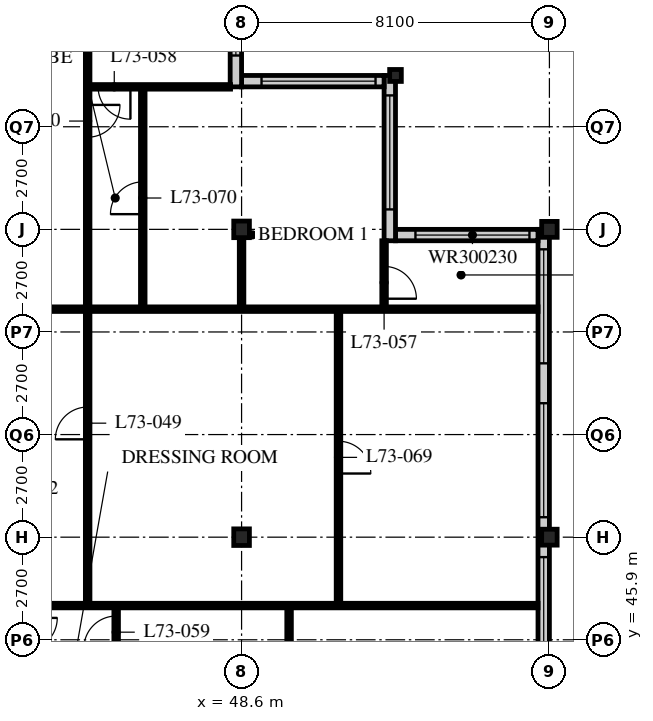
"""IFC4 building model, lengths in metres.
Left out: names, types, materials, properties, quantities, classifications, styles, units other than length and angle.
Written with IfcOpenShell. Run it as: python <this file> out.ifc"""

import sys

from ifc_helpers import new_model, si_unit, direction, frame, frame_2d, origin, origin_2d, place, context, subcontext, project, spatial, rectangle, i_section, extrude, element, fill, save


model = new_model("IFC4")
c1 = context("Model", 3, precision=1e-05, world=origin(), true_north=direction((0.0, 1.0)))
c2 = subcontext(c1, "Body", "Model", "MODEL_VIEW")
j1 = project(units=[si_unit("LENGTHUNIT", "METRE"), si_unit("PLANEANGLEUNIT", "RADIAN")], contexts=[c1])
p1 = place(None, origin())
s1 = spatial("IfcSite", under=j1, at=p1, CompositionType="ELEMENT")
p2 = place(p1, origin())
s2 = spatial("IfcBuilding", under=s1, at=p2, CompositionType="ELEMENT")
p3 = place(p2, frame((0.0, 0.0, 285.3)))
s3 = spatial("IfcBuildingStorey", under=s2, at=p3, CompositionType="ELEMENT", Elevation=285.3)
for number, where, z_axis, x_axis in (
    (1, (48.6, 48.6, 0.0), (0.0, 0.0, 1.0), (1.0, 0.0, 0.0)),
    (2, (48.6, 56.7, 0.0), (0.0, 0.0, 1.0), (1.0, 0.0, 0.0)),
):
    element("IfcColumn", number, at=place(p3, frame(where, z_axis=z_axis, x_axis=x_axis)), inside=s3, PredefinedType="COLUMN", context=c2, shape_type="SweptSolid", body=[
        extrude(i_section(OverallWidth=0.412, OverallDepth=0.437, WebThickness=0.036, FlangeThickness=0.058, FilletRadius=0.015, at=origin_2d()), origin(), (0.0, 0.0, 1.0), 3.9),
    ])
p4 = place(p3, frame((52.65, 60.75, 0.0), z_axis=(0.0, 0.0, 1.0), x_axis=(1.0, 0.0, 0.0)))
e3 = element("IfcColumn", 3, at=p4, inside=s3, PredefinedType="COLUMN", context=c2, shape_type="SweptSolid", body=[
    extrude(i_section(OverallWidth=0.307, OverallDepth=0.314, WebThickness=0.012, FlangeThickness=0.019, FilletRadius=0.015, at=origin_2d()), origin(), (0.0, 0.0, 1.0), 3.9),
])
for number, where, z_axis, x_axis in (
    (4, (56.7, 48.6, 0.0), (0.0, 0.0, 1.0), (1.0, 0.0, 0.0)),
    (5, (56.7, 56.7, 0.0), (0.0, 0.0, 1.0), (1.0, 0.0, 0.0)),
):
    element("IfcColumn", number, at=place(p3, frame(where, z_axis=z_axis, x_axis=x_axis)), inside=s3, PredefinedType="COLUMN", context=c2, shape_type="SweptSolid", body=[
        extrude(i_section(OverallWidth=0.407, OverallDepth=0.419, WebThickness=0.031, FlangeThickness=0.049, FilletRadius=0.015, at=origin_2d()), origin(), (0.0, 0.0, 1.0), 3.9),
    ])
p5 = place(p3, frame((56.55, 24.6, 0.0), z_axis=(0.0, 0.0, 1.0), x_axis=(0.0, 1.0, 0.0)))
e6 = element("IfcWall", 6, at=p5, inside=s3, PredefinedType="SOLIDWALL", context=c2, shape_type="SweptSolid", body=[
    extrude(rectangle(XDim=32.1, YDim=0.3, at=frame_2d((16.05, 0.0))), origin(), (0.0, 0.0, 1.0), 3.69),
])
p6 = place(p5, frame((0.225, 0.0, 0.6)))
e7 = element("IfcOpeningElement", 7, at=p6, cuts=e6, PredefinedType="OPENING", context=c2, shape_type="SweptSolid", body=[
    extrude(rectangle(XDim=3.0, YDim=2.4, at=frame_2d((1.5, 1.2))), frame((0.0, 0.16, 0.0), z_axis=(0.0, -1.0, 0.0), x_axis=(1.0, 0.0, 0.0)), (0.0, 0.0, 1.0), 0.32),
])
p7 = place(p5, frame((4.275, 0.0, 0.6)))
e8 = element("IfcOpeningElement", 8, at=p7, cuts=e6, PredefinedType="OPENING", context=c2, shape_type="SweptSolid", body=[
    extrude(rectangle(XDim=3.0, YDim=2.4, at=frame_2d((1.5, 1.2))), frame((0.0, 0.16, 0.0), z_axis=(0.0, -1.0, 0.0), x_axis=(1.0, 0.0, 0.0)), (0.0, 0.0, 1.0), 0.32),
])
p8 = place(p5, frame((8.325, 0.0, 0.6)))
e9 = element("IfcOpeningElement", 9, at=p8, cuts=e6, PredefinedType="OPENING", context=c2, shape_type="SweptSolid", body=[
    extrude(rectangle(XDim=3.0, YDim=2.4, at=frame_2d((1.5, 1.2))), frame((0.0, 0.16, 0.0), z_axis=(0.0, -1.0, 0.0), x_axis=(1.0, 0.0, 0.0)), (0.0, 0.0, 1.0), 0.32),
])
p9 = place(p5, frame((12.375, 0.0, 0.6)))
e10 = element("IfcOpeningElement", 10, at=p9, cuts=e6, PredefinedType="OPENING", context=c2, shape_type="SweptSolid", body=[
    extrude(rectangle(XDim=3.0, YDim=2.4, at=frame_2d((1.5, 1.2))), frame((0.0, 0.16, 0.0), z_axis=(0.0, -1.0, 0.0), x_axis=(1.0, 0.0, 0.0)), (0.0, 0.0, 1.0), 0.32),
])
p10 = place(p5, frame((16.425, 0.0, 0.6)))
e11 = element("IfcOpeningElement", 11, at=p10, cuts=e6, PredefinedType="OPENING", context=c2, shape_type="SweptSolid", body=[
    extrude(rectangle(XDim=3.0, YDim=2.4, at=frame_2d((1.5, 1.2))), frame((0.0, 0.16, 0.0), z_axis=(0.0, -1.0, 0.0), x_axis=(1.0, 0.0, 0.0)), (0.0, 0.0, 1.0), 0.32),
])
p11 = place(p5, frame((20.475, 0.0, 0.6)))
e12 = element("IfcOpeningElement", 12, at=p11, cuts=e6, PredefinedType="OPENING", context=c2, shape_type="SweptSolid", body=[
    extrude(rectangle(XDim=3.0, YDim=2.4, at=frame_2d((1.5, 1.2))), frame((0.0, 0.16, 0.0), z_axis=(0.0, -1.0, 0.0), x_axis=(1.0, 0.0, 0.0)), (0.0, 0.0, 1.0), 0.32),
])
p12 = place(p5, frame((24.525, 0.0, 0.6)))
e13 = element("IfcOpeningElement", 13, at=p12, cuts=e6, PredefinedType="OPENING", context=c2, shape_type="SweptSolid", body=[
    extrude(rectangle(XDim=3.0, YDim=2.4, at=frame_2d((1.5, 1.2))), frame((0.0, 0.16, 0.0), z_axis=(0.0, -1.0, 0.0), x_axis=(1.0, 0.0, 0.0)), (0.0, 0.0, 1.0), 0.32),
])
p13 = place(p5, frame((28.575, 0.0, 0.6)))
e14 = element("IfcOpeningElement", 14, at=p13, cuts=e6, PredefinedType="OPENING", context=c2, shape_type="SweptSolid", body=[
    extrude(rectangle(XDim=3.0, YDim=2.4, at=frame_2d((1.5, 1.2))), frame((0.0, 0.16, 0.0), z_axis=(0.0, -1.0, 0.0), x_axis=(1.0, 0.0, 0.0)), (0.0, 0.0, 1.0), 0.32),
])
p14 = place(p3, frame((56.4, 56.55, 0.0), z_axis=(0.0, 0.0, 1.0), x_axis=(-1.0, 0.0, 0.0)))
e15 = element("IfcWall", 15, at=p14, inside=s3, PredefinedType="SOLIDWALL", context=c2, shape_type="SweptSolid", body=[
    extrude(rectangle(XDim=3.75, YDim=0.3, at=frame_2d((1.875, 0.0))), origin(), (0.0, 0.0, 1.0), 3.69),
])
p15 = place(p14, frame((0.225, 0.0, 0.6)))
e16 = element("IfcOpeningElement", 16, at=p15, cuts=e15, PredefinedType="OPENING", context=c2, shape_type="SweptSolid", body=[
    extrude(rectangle(XDim=3.0, YDim=2.3, at=frame_2d((1.5, 1.15))), frame((0.0, 0.16, 0.0), z_axis=(0.0, -1.0, 0.0), x_axis=(1.0, 0.0, 0.0)), (0.0, 0.0, 1.0), 0.32),
])
p16 = place(p3, frame((52.5, 56.4, 0.0), z_axis=(0.0, 0.0, 1.0), x_axis=(0.0, 1.0, 0.0)))
e17 = element("IfcWall", 17, at=p16, inside=s3, PredefinedType="SOLIDWALL", context=c2, shape_type="SweptSolid", body=[
    extrude(rectangle(XDim=4.35, YDim=0.3, at=frame_2d((2.175, 0.0))), origin(), (0.0, 0.0, 1.0), 3.69),
])
p17 = place(p16, frame((0.825, 0.0, 0.6)))
e18 = element("IfcOpeningElement", 18, at=p17, cuts=e17, PredefinedType="OPENING", context=c2, shape_type="SweptSolid", body=[
    extrude(rectangle(XDim=3.0, YDim=2.3, at=frame_2d((1.5, 1.15))), frame((0.0, 0.16, 0.0), z_axis=(0.0, -1.0, 0.0), x_axis=(1.0, 0.0, 0.0)), (0.0, 0.0, 1.0), 0.32),
])
p18 = place(p3, frame((52.35, 60.6, 0.0), z_axis=(0.0, 0.0, 1.0), x_axis=(-1.0, 0.0, 0.0)))
e19 = element("IfcWall", 19, at=p18, inside=s3, PredefinedType="SOLIDWALL", context=c2, shape_type="SweptSolid", body=[
    extrude(rectangle(XDim=3.75, YDim=0.3, at=frame_2d((1.875, 0.0))), origin(), (0.0, 0.0, 1.0), 3.69),
])
p19 = place(p18, frame((0.225, 0.0, 0.6)))
e20 = element("IfcOpeningElement", 20, at=p19, cuts=e19, PredefinedType="OPENING", context=c2, shape_type="SweptSolid", body=[
    extrude(rectangle(XDim=3.0, YDim=2.3, at=frame_2d((1.5, 1.15))), frame((0.0, 0.16, 0.0), z_axis=(0.0, -1.0, 0.0), x_axis=(1.0, 0.0, 0.0)), (0.0, 0.0, 1.0), 0.32),
])
p20 = place(p3, frame((48.45, 60.45, 0.0), z_axis=(0.0, 0.0, 1.0), x_axis=(0.0, 1.0, 0.0)))
e21 = element("IfcWall", 21, at=p20, inside=s3, PredefinedType="SOLIDWALL", context=c2, shape_type="SweptSolid", body=[
    extrude(rectangle(XDim=4.35, YDim=0.3, at=frame_2d((2.175, 0.0))), origin(), (0.0, 0.0, 1.0), 3.69),
])
p21 = place(p20, frame((0.825, 0.0, 0.6)))
e22 = element("IfcOpeningElement", 22, at=p21, cuts=e21, PredefinedType="OPENING", context=c2, shape_type="SweptSolid", body=[
    extrude(rectangle(XDim=3.0, YDim=2.3, at=frame_2d((1.5, 1.15))), frame((0.0, 0.16, 0.0), z_axis=(0.0, -1.0, 0.0), x_axis=(1.0, 0.0, 0.0)), (0.0, 0.0, 1.0), 0.32),
])
p22 = place(p3, frame((42.9, 46.8, 0.0), z_axis=(0.0, 0.0, 1.0), x_axis=(1.0, 0.0, 0.0)))
e23 = element("IfcWall", 23, at=p22, inside=s3, PredefinedType="PARTITIONING", context=c2, shape_type="SweptSolid", body=[
    extrude(rectangle(XDim=13.5, YDim=0.12, at=frame_2d((6.75, 0.0))), origin(), (0.0, 0.0, 1.0), 3.69),
])
p23 = place(p3, frame((36.45, 54.6, 0.0), z_axis=(0.0, 0.0, 1.0), x_axis=(1.0, 0.0, 0.0)))
e24 = element("IfcWall", 24, at=p23, inside=s3, PredefinedType="PARTITIONING", context=c2, shape_type="SweptSolid", body=[
    extrude(rectangle(XDim=19.95, YDim=0.12, at=frame_2d((9.975, 0.0))), origin(), (0.0, 0.0, 1.0), 3.69),
])
p24 = place(p23, frame((1.675, 0.0, 0.0)))
e25 = element("IfcOpeningElement", 25, at=p24, cuts=e24, PredefinedType="OPENING", context=c2, shape_type="SweptSolid", body=[
    extrude(rectangle(XDim=0.85, YDim=2.1, at=frame_2d((0.425, 1.05))), frame((0.0, 0.07, 0.0), z_axis=(0.0, -1.0, 0.0), x_axis=(1.0, 0.0, 0.0)), (0.0, 0.0, 1.0), 0.14),
])
p25 = place(p3, frame((44.55, 64.5, 0.0), z_axis=(0.0, 0.0, 1.0), x_axis=(0.0, -1.0, 0.0)))
e26 = element("IfcWall", 26, at=p25, inside=s3, PredefinedType="PARTITIONING", context=c2, shape_type="SweptSolid", body=[
    extrude(rectangle(XDim=17.7, YDim=0.12, at=frame_2d((8.85, 0.0))), origin(), (0.0, 0.0, 1.0), 3.69),
])
p26 = place(p25, frame((12.475, 0.0, 0.0)))
e27 = element("IfcOpeningElement", 27, at=p26, cuts=e26, PredefinedType="OPENING", context=c2, shape_type="SweptSolid", body=[
    extrude(rectangle(XDim=0.85, YDim=2.1, at=frame_2d((0.425, 1.05))), frame((0.0, 0.07, 0.0), z_axis=(0.0, -1.0, 0.0), x_axis=(1.0, 0.0, 0.0)), (0.0, 0.0, 1.0), 0.14),
])
p27 = place(p25, frame((4.525, 0.0, 0.0)))
e28 = element("IfcOpeningElement", 28, at=p27, cuts=e26, PredefinedType="OPENING", context=c2, shape_type="SweptSolid", body=[
    extrude(rectangle(XDim=0.85, YDim=2.1, at=frame_2d((0.425, 1.05))), frame((0.0, 0.07, 0.0), z_axis=(0.0, -1.0, 0.0), x_axis=(1.0, 0.0, 0.0)), (0.0, 0.0, 1.0), 0.14),
])
p28 = place(p3, frame((52.35, 54.6, 0.0), z_axis=(0.0, 0.0, 1.0), x_axis=(0.0, 1.0, 0.0)))
e29 = element("IfcWall", 29, at=p28, inside=s3, PredefinedType="PARTITIONING", context=c2, shape_type="SweptSolid", body=[
    extrude(rectangle(XDim=1.8, YDim=0.12, at=frame_2d((0.9, 0.0))), origin(), (0.0, 0.0, 1.0), 3.69),
])
p29 = place(p28, frame((0.275, 0.0, 0.0)))
e30 = element("IfcOpeningElement", 30, at=p29, cuts=e29, PredefinedType="OPENING", context=c2, shape_type="SweptSolid", body=[
    extrude(rectangle(XDim=0.85, YDim=2.1, at=frame_2d((0.425, 1.05))), frame((0.0, 0.07, 0.0), z_axis=(0.0, -1.0, 0.0), x_axis=(1.0, 0.0, 0.0)), (0.0, 0.0, 1.0), 0.14),
])
p30 = place(p3, frame((48.31, 60.45, 0.0), z_axis=(0.0, 0.0, 1.0), x_axis=(-1.0, 0.0, 0.0)))
e31 = element("IfcWall", 31, at=p30, inside=s3, PredefinedType="PARTITIONING", context=c2, shape_type="SweptSolid", body=[
    extrude(rectangle(XDim=3.76, YDim=0.12, at=frame_2d((1.88, 0.0))), origin(), (0.0, 0.0, 1.0), 3.69),
])
p31 = place(p30, frame((2.635, 0.0, 0.0)))
e32 = element("IfcOpeningElement", 32, at=p31, cuts=e31, PredefinedType="OPENING", context=c2, shape_type="SweptSolid", body=[
    extrude(rectangle(XDim=0.85, YDim=2.1, at=frame_2d((0.425, 1.05))), frame((0.0, 0.07, 0.0), z_axis=(0.0, -1.0, 0.0), x_axis=(1.0, 0.0, 0.0)), (0.0, 0.0, 1.0), 0.14),
])
p32 = place(p3, frame((45.3, 46.8, 0.0), z_axis=(0.0, 0.0, 1.0), x_axis=(0.0, -1.0, 0.0)))
e33 = element("IfcWall", 33, at=p32, inside=s3, PredefinedType="PARTITIONING", context=c2, shape_type="SweptSolid", body=[
    extrude(rectangle(XDim=4.01, YDim=0.12, at=frame_2d((2.005, 0.0))), origin(), (0.0, 0.0, 1.0), 3.69),
])
p33 = place(p32, frame((0.275, 0.0, 0.0)))
e34 = element("IfcOpeningElement", 34, at=p33, cuts=e33, PredefinedType="OPENING", context=c2, shape_type="SweptSolid", body=[
    extrude(rectangle(XDim=0.85, YDim=2.1, at=frame_2d((0.425, 1.05))), frame((0.0, 0.07, 0.0), z_axis=(0.0, -1.0, 0.0), x_axis=(1.0, 0.0, 0.0)), (0.0, 0.0, 1.0), 0.14),
])
p34 = place(p3, frame((51.15, 46.8, 0.0), z_axis=(0.0, 0.0, 1.0), x_axis=(0.0, 1.0, 0.0)))
e35 = element("IfcWall", 35, at=p34, inside=s3, PredefinedType="PARTITIONING", context=c2, shape_type="SweptSolid", body=[
    extrude(rectangle(XDim=7.8, YDim=0.12, at=frame_2d((3.9, 0.0))), origin(), (0.0, 0.0, 1.0), 3.69),
])
p35 = place(p34, frame((3.475, 0.0, 0.0)))
e36 = element("IfcOpeningElement", 36, at=p35, cuts=e35, PredefinedType="OPENING", context=c2, shape_type="SweptSolid", body=[
    extrude(rectangle(XDim=0.85, YDim=2.1, at=frame_2d((0.425, 1.05))), frame((0.0, 0.07, 0.0), z_axis=(0.0, -1.0, 0.0), x_axis=(1.0, 0.0, 0.0)), (0.0, 0.0, 1.0), 0.14),
])
p36 = place(p3, frame((46.0, 54.6, 0.0), z_axis=(0.0, 0.0, 1.0), x_axis=(0.0, 1.0, 0.0)))
e37 = element("IfcWall", 37, at=p36, inside=s3, PredefinedType="PARTITIONING", context=c2, shape_type="SweptSolid", body=[
    extrude(rectangle(XDim=5.85, YDim=0.12, at=frame_2d((2.925, 0.0))), origin(), (0.0, 0.0, 1.0), 3.69),
])
p37 = place(p36, frame((2.5, 0.0, 0.0)))
e38 = element("IfcOpeningElement", 38, at=p37, cuts=e37, PredefinedType="OPENING", context=c2, shape_type="SweptSolid", body=[
    extrude(rectangle(XDim=0.85, YDim=2.1, at=frame_2d((0.425, 1.05))), frame((0.0, 0.07, 0.0), z_axis=(0.0, -1.0, 0.0), x_axis=(1.0, 0.0, 0.0)), (0.0, 0.0, 1.0), 0.14),
])
p38 = place(p3, frame((49.85, 40.5, 0.0), z_axis=(0.0, 0.0, 1.0), x_axis=(0.0, 1.0, 0.0)))
e39 = element("IfcWall", 39, at=p38, inside=s3, PredefinedType="PARTITIONING", context=c2, shape_type="SweptSolid", body=[
    extrude(rectangle(XDim=6.3, YDim=0.12, at=frame_2d((3.15, 0.0))), origin(), (0.0, 0.0, 1.0), 3.69),
])
p39 = place(p38, frame((2.725, 0.0, 0.0)))
e40 = element("IfcOpeningElement", 40, at=p39, cuts=e39, PredefinedType="OPENING", context=c2, shape_type="SweptSolid", body=[
    extrude(rectangle(XDim=0.85, YDim=2.1, at=frame_2d((0.425, 1.05))), frame((0.0, 0.07, 0.0), z_axis=(0.0, -1.0, 0.0), x_axis=(1.0, 0.0, 0.0)), (0.0, 0.0, 1.0), 0.14),
])
p40 = place(p3, frame((48.6, 54.6, 0.0), z_axis=(0.0, 0.0, 1.0), x_axis=(0.0, 1.0, 0.0)))
e41 = element("IfcWall", 41, at=p40, inside=s3, PredefinedType="PARTITIONING", context=c2, shape_type="SweptSolid", body=[
    extrude(rectangle(XDim=1.897, YDim=0.12, at=frame_2d((0.948, 0.0))), origin(), (0.0, 0.0, 1.0), 3.078),
])
p41 = place(p11, origin())
e42 = element("IfcWindow", 42, at=p41, inside=s3, PartitioningType="SINGLE_PANEL", PredefinedType="WINDOW", context=c2, shape_type="SweptSolid", body=[
    extrude(rectangle(XDim=3.0, YDim=2.4, at=frame_2d((1.5, 1.2))), frame((0.0, 0.03, 0.0), z_axis=(0.0, -1.0, 0.0), x_axis=(1.0, 0.0, 0.0)), (0.0, 0.0, 1.0), 0.06),
])
fill(e12, e42)
p42 = place(p12, origin())
e43 = element("IfcWindow", 43, at=p42, inside=s3, PartitioningType="SINGLE_PANEL", PredefinedType="WINDOW", context=c2, shape_type="SweptSolid", body=[
    extrude(rectangle(XDim=3.0, YDim=2.4, at=frame_2d((1.5, 1.2))), frame((0.0, 0.03, 0.0), z_axis=(0.0, -1.0, 0.0), x_axis=(1.0, 0.0, 0.0)), (0.0, 0.0, 1.0), 0.06),
])
fill(e13, e43)
p43 = place(p13, origin())
e44 = element("IfcWindow", 44, at=p43, inside=s3, PartitioningType="SINGLE_PANEL", PredefinedType="WINDOW", context=c2, shape_type="SweptSolid", body=[
    extrude(rectangle(XDim=3.0, YDim=2.4, at=frame_2d((1.5, 1.2))), frame((0.0, 0.03, 0.0), z_axis=(0.0, -1.0, 0.0), x_axis=(1.0, 0.0, 0.0)), (0.0, 0.0, 1.0), 0.06),
])
fill(e14, e44)
p44 = place(p15, origin())
e45 = element("IfcWindow", 45, at=p44, inside=s3, PartitioningType="SINGLE_PANEL", PredefinedType="WINDOW", context=c2, shape_type="SweptSolid", body=[
    extrude(rectangle(XDim=3.0, YDim=2.3, at=frame_2d((1.5, 1.15))), frame((0.0, 0.03, 0.0), z_axis=(0.0, -1.0, 0.0), x_axis=(1.0, 0.0, 0.0)), (0.0, 0.0, 1.0), 0.06),
])
fill(e16, e45)
p45 = place(p17, origin())
e46 = element("IfcWindow", 46, at=p45, inside=s3, PartitioningType="SINGLE_PANEL", PredefinedType="WINDOW", context=c2, shape_type="SweptSolid", body=[
    extrude(rectangle(XDim=3.0, YDim=2.3, at=frame_2d((1.5, 1.15))), frame((0.0, 0.03, 0.0), z_axis=(0.0, -1.0, 0.0), x_axis=(1.0, 0.0, 0.0)), (0.0, 0.0, 1.0), 0.06),
])
fill(e18, e46)
p46 = place(p19, origin())
e47 = element("IfcWindow", 47, at=p46, inside=s3, PartitioningType="SINGLE_PANEL", PredefinedType="WINDOW", context=c2, shape_type="SweptSolid", body=[
    extrude(rectangle(XDim=3.0, YDim=2.3, at=frame_2d((1.5, 1.15))), frame((0.0, 0.03, 0.0), z_axis=(0.0, -1.0, 0.0), x_axis=(1.0, 0.0, 0.0)), (0.0, 0.0, 1.0), 0.06),
])
fill(e20, e47)
p47 = place(p21, origin())
e48 = element("IfcWindow", 48, at=p47, inside=s3, PartitioningType="SINGLE_PANEL", PredefinedType="WINDOW", context=c2, shape_type="SweptSolid", body=[
    extrude(rectangle(XDim=3.0, YDim=2.3, at=frame_2d((1.5, 1.15))), frame((0.0, 0.03, 0.0), z_axis=(0.0, -1.0, 0.0), x_axis=(1.0, 0.0, 0.0)), (0.0, 0.0, 1.0), 0.06),
])
fill(e22, e48)
p48 = place(p26, origin())
e49 = element("IfcDoor", 49, at=p48, inside=s3, OperationType="SINGLE_SWING_LEFT", PredefinedType="DOOR", context=c2, shape_type="SweptSolid", body=[
    extrude(rectangle(XDim=0.85, YDim=2.1, at=frame_2d((0.425, 1.05))), frame((0.0, 0.025, 0.0), z_axis=(0.0, -1.0, 0.0), x_axis=(1.0, 0.0, 0.0)), (0.0, 0.0, 1.0), 0.05),
])
fill(e27, e49)
p49 = place(p27, origin())
e50 = element("IfcDoor", 50, at=p49, inside=s3, OperationType="SINGLE_SWING_LEFT", PredefinedType="DOOR", context=c2, shape_type="SweptSolid", body=[
    extrude(rectangle(XDim=0.85, YDim=2.1, at=frame_2d((0.425, 1.05))), frame((0.0, 0.025, 0.0), z_axis=(0.0, -1.0, 0.0), x_axis=(1.0, 0.0, 0.0)), (0.0, 0.0, 1.0), 0.05),
])
fill(e28, e50)
p50 = place(p29, origin())
e51 = element("IfcDoor", 51, at=p50, inside=s3, OperationType="SINGLE_SWING_RIGHT", PredefinedType="DOOR", context=c2, shape_type="SweptSolid", body=[
    extrude(rectangle(XDim=0.85, YDim=2.1, at=frame_2d((0.425, 1.05))), frame((0.0, 0.025, 0.0), z_axis=(0.0, -1.0, 0.0), x_axis=(1.0, 0.0, 0.0)), (0.0, 0.0, 1.0), 0.05),
])
fill(e30, e51)
p51 = place(p31, origin())
e52 = element("IfcDoor", 52, at=p51, inside=s3, OperationType="SINGLE_SWING_LEFT", PredefinedType="DOOR", context=c2, shape_type="SweptSolid", body=[
    extrude(rectangle(XDim=0.85, YDim=2.1, at=frame_2d((0.425, 1.05))), frame((0.0, 0.025, 0.0), z_axis=(0.0, -1.0, 0.0), x_axis=(1.0, 0.0, 0.0)), (0.0, 0.0, 1.0), 0.05),
])
fill(e32, e52)
p52 = place(p33, origin())
e53 = element("IfcDoor", 53, at=p52, inside=s3, OperationType="SINGLE_SWING_LEFT", PredefinedType="DOOR", context=c2, shape_type="SweptSolid", body=[
    extrude(rectangle(XDim=0.85, YDim=2.1, at=frame_2d((0.425, 1.05))), frame((0.0, 0.025, 0.0), z_axis=(0.0, -1.0, 0.0), x_axis=(1.0, 0.0, 0.0)), (0.0, 0.0, 1.0), 0.05),
])
fill(e34, e53)
p53 = place(p35, origin())
e54 = element("IfcDoor", 54, at=p53, inside=s3, OperationType="SINGLE_SWING_RIGHT", PredefinedType="DOOR", context=c2, shape_type="SweptSolid", body=[
    extrude(rectangle(XDim=0.85, YDim=2.1, at=frame_2d((0.425, 1.05))), frame((0.0, 0.025, 0.0), z_axis=(0.0, -1.0, 0.0), x_axis=(1.0, 0.0, 0.0)), (0.0, 0.0, 1.0), 0.05),
])
fill(e36, e54)
p54 = place(p37, origin())
e55 = element("IfcDoor", 55, at=p54, inside=s3, OperationType="SINGLE_SWING_LEFT", PredefinedType="DOOR", context=c2, shape_type="SweptSolid", body=[
    extrude(rectangle(XDim=0.85, YDim=2.1, at=frame_2d((0.425, 1.05))), frame((0.0, 0.025, 0.0), z_axis=(0.0, -1.0, 0.0), x_axis=(1.0, 0.0, 0.0)), (0.0, 0.0, 1.0), 0.05),
])
fill(e38, e55)
save(model, sys.argv[1])
